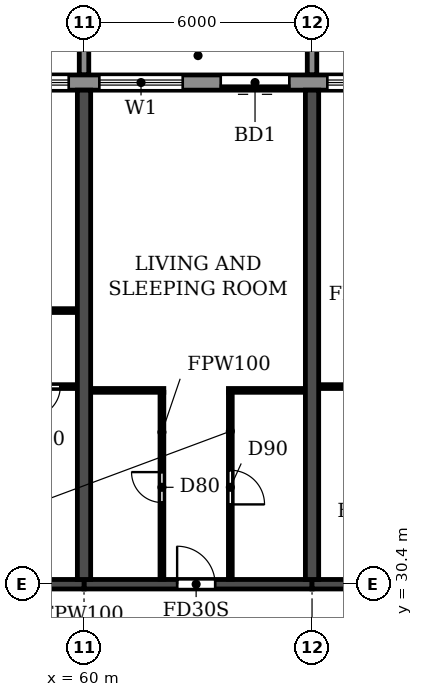
"""IFC4 building model, lengths in metres.
Left out: names, types, materials, properties, quantities, classifications, styles, units other than length and angle.
Written with IfcOpenShell. Run it as: python <this file> out.ifc"""

import sys

from ifc_helpers import new_model, si_unit, direction, frame, frame_2d, origin, place, context, subcontext, project, spatial, polyline, rectangle, outline, extrude, source, transform, mapped, element, fill, save


model = new_model("IFC4")
c1 = context("Model", 3, precision=1e-05, world=origin(), true_north=direction((0.0, 1.0)))
c2 = subcontext(c1, "Body", "Model", "MODEL_VIEW")
j1 = project(units=[si_unit("LENGTHUNIT", "METRE"), si_unit("PLANEANGLEUNIT", "RADIAN")], contexts=[c1])
p1 = place(None, origin())
s1 = spatial("IfcSite", under=j1, at=p1, CompositionType="ELEMENT")
p2 = place(p1, origin())
s2 = spatial("IfcBuilding", under=s1, at=p2, CompositionType="ELEMENT")
p3 = place(p2, frame((0.0, 0.0, 102.6)))
s3 = spatial("IfcBuildingStorey", under=s2, at=p3, CompositionType="ELEMENT", Elevation=102.6)
for number, where, z_axis, x_axis in (
    (1, (60.0, 30.525, 0.0), (0.0, 0.0, 1.0), (0.0, 1.0, 0.0)),
    (2, (66.0, 30.525, 0.0), (0.0, 0.0, 1.0), (0.0, 1.0, 0.0)),
):
    element("IfcWall", number, at=place(p3, frame(where, z_axis=z_axis, x_axis=x_axis)), inside=s3, PredefinedType="SHEAR", context=c2, shape_type="SweptSolid", body=[
        extrude(rectangle(XDim=12.875, YDim=0.35, at=frame_2d((6.438, 0.0))), origin(), (0.0, 0.0, 1.0), 3.0),
    ])
p4 = place(p3, frame((54.0, 30.4, 0.0), z_axis=(0.0, 0.0, 1.0), x_axis=(1.0, 0.0, 0.0)))
e3 = element("IfcWall", 3, at=p4, inside=s3, PredefinedType="SHEAR", context=c2, shape_type="SweptSolid", body=[
    extrude(rectangle(XDim=6.0, YDim=0.25, at=frame_2d((3.0, 0.0))), origin(), (0.0, 0.0, 1.0), 2.4),
])
p5 = place(p4, frame((2.55, 0.0, 0.0)))
e4 = element("IfcOpeningElement", 4, at=p5, cuts=e3, PredefinedType="OPENING", context=c2, shape_type="SweptSolid", body=[
    extrude(rectangle(XDim=1.0, YDim=2.1, at=frame_2d((0.5, 1.05))), frame((0.0, 0.135, 0.0), z_axis=(0.0, -1.0, 0.0), x_axis=(1.0, 0.0, 0.0)), (0.0, 0.0, 1.0), 0.27),
])
p6 = place(p3, frame((60.0, 30.4, 0.0), z_axis=(0.0, 0.0, 1.0), x_axis=(1.0, 0.0, 0.0)))
e5 = element("IfcWall", 5, at=p6, inside=s3, PredefinedType="SHEAR", context=c2, shape_type="SweptSolid", body=[
    extrude(rectangle(XDim=6.0, YDim=0.25, at=frame_2d((3.0, 0.0))), origin(), (0.0, 0.0, 1.0), 2.4),
])
p7 = place(p6, frame((2.45, 0.0, 0.0)))
e6 = element("IfcOpeningElement", 6, at=p7, cuts=e5, PredefinedType="OPENING", context=c2, shape_type="SweptSolid", body=[
    extrude(rectangle(XDim=1.0, YDim=2.1, at=frame_2d((0.5, 1.05))), frame((0.0, 0.135, 0.0), z_axis=(0.0, -1.0, 0.0), x_axis=(1.0, 0.0, 0.0)), (0.0, 0.0, 1.0), 0.27),
])
p8 = place(p3, frame((66.0, 30.4, 0.0), z_axis=(0.0, 0.0, 1.0), x_axis=(1.0, 0.0, 0.0)))
e7 = element("IfcWall", 7, at=p8, inside=s3, PredefinedType="SHEAR", context=c2, shape_type="SweptSolid", body=[
    extrude(rectangle(XDim=6.0, YDim=0.25, at=frame_2d((3.0, 0.0))), origin(), (0.0, 0.0, 1.0), 2.4),
])
p9 = place(p3, frame((91.317, 43.6, 0.0), z_axis=(0.0, 0.0, 1.0), x_axis=(-1.0, 0.0, 0.0)))
e8 = element("IfcWall", 8, at=p9, inside=s3, PredefinedType="STANDARD", context=c2, shape_type="SweptSolid", body=[
    extrude(rectangle(XDim=80.634, YDim=0.4, at=frame_2d((40.317, 0.0))), origin(), (0.0, 0.0, 1.0), 3.0),
])
p10 = place(p9, frame((76.717, 0.0, 0.9)))
e9 = element("IfcOpeningElement", 9, at=p10, cuts=e8, PredefinedType="OPENING", context=c2, shape_type="SweptSolid", body=[
    extrude(rectangle(XDim=2.2, YDim=1.5, at=frame_2d((1.1, 0.75))), frame((0.0, 0.21, 0.0), z_axis=(0.0, -1.0, 0.0), x_axis=(1.0, 0.0, 0.0)), (0.0, 0.0, 1.0), 0.42),
])
p11 = place(p9, frame((73.917, 0.0, 0.0)))
e10 = element("IfcOpeningElement", 10, at=p11, cuts=e8, PredefinedType="OPENING", context=c2, shape_type="SweptSolid", body=[
    extrude(rectangle(XDim=1.8, YDim=2.4, at=frame_2d((0.9, 1.2))), frame((0.0, 0.21, 0.0), z_axis=(0.0, -1.0, 0.0), x_axis=(1.0, 0.0, 0.0)), (0.0, 0.0, 1.0), 0.42),
])
p12 = place(p9, frame((70.717, 0.0, 0.9)))
e11 = element("IfcOpeningElement", 11, at=p12, cuts=e8, PredefinedType="OPENING", context=c2, shape_type="SweptSolid", body=[
    extrude(rectangle(XDim=2.2, YDim=1.5, at=frame_2d((1.1, 0.75))), frame((0.0, 0.21, 0.0), z_axis=(0.0, -1.0, 0.0), x_axis=(1.0, 0.0, 0.0)), (0.0, 0.0, 1.0), 0.42),
])
p13 = place(p9, frame((67.717, 0.0, 0.9)))
e12 = element("IfcOpeningElement", 12, at=p13, cuts=e8, PredefinedType="OPENING", context=c2, shape_type="SweptSolid", body=[
    extrude(rectangle(XDim=2.2, YDim=1.5, at=frame_2d((1.1, 0.75))), frame((0.0, 0.21, 0.0), z_axis=(0.0, -1.0, 0.0), x_axis=(1.0, 0.0, 0.0)), (0.0, 0.0, 1.0), 0.42),
])
p14 = place(p9, frame((64.917, 0.0, 0.0)))
e13 = element("IfcOpeningElement", 13, at=p14, cuts=e8, PredefinedType="OPENING", context=c2, shape_type="SweptSolid", body=[
    extrude(rectangle(XDim=1.8, YDim=2.4, at=frame_2d((0.9, 1.2))), frame((0.0, 0.21, 0.0), z_axis=(0.0, -1.0, 0.0), x_axis=(1.0, 0.0, 0.0)), (0.0, 0.0, 1.0), 0.42),
])
p15 = place(p9, frame((61.717, 0.0, 0.9)))
e14 = element("IfcOpeningElement", 14, at=p15, cuts=e8, PredefinedType="OPENING", context=c2, shape_type="SweptSolid", body=[
    extrude(rectangle(XDim=2.2, YDim=1.5, at=frame_2d((1.1, 0.75))), frame((0.0, 0.21, 0.0), z_axis=(0.0, -1.0, 0.0), x_axis=(1.0, 0.0, 0.0)), (0.0, 0.0, 1.0), 0.42),
])
p16 = place(p9, frame((58.717, 0.0, 0.9)))
e15 = element("IfcOpeningElement", 15, at=p16, cuts=e8, PredefinedType="OPENING", context=c2, shape_type="SweptSolid", body=[
    extrude(rectangle(XDim=2.2, YDim=1.5, at=frame_2d((1.1, 0.75))), frame((0.0, 0.21, 0.0), z_axis=(0.0, -1.0, 0.0), x_axis=(1.0, 0.0, 0.0)), (0.0, 0.0, 1.0), 0.42),
])
p17 = place(p9, frame((55.717, 0.0, 0.9)))
e16 = element("IfcOpeningElement", 16, at=p17, cuts=e8, PredefinedType="OPENING", context=c2, shape_type="SweptSolid", body=[
    extrude(rectangle(XDim=2.2, YDim=1.5, at=frame_2d((1.1, 0.75))), frame((0.0, 0.21, 0.0), z_axis=(0.0, -1.0, 0.0), x_axis=(1.0, 0.0, 0.0)), (0.0, 0.0, 1.0), 0.42),
])
p18 = place(p9, frame((52.717, 0.0, 0.9)))
e17 = element("IfcOpeningElement", 17, at=p18, cuts=e8, PredefinedType="OPENING", context=c2, shape_type="SweptSolid", body=[
    extrude(rectangle(XDim=2.2, YDim=1.5, at=frame_2d((1.1, 0.75))), frame((0.0, 0.21, 0.0), z_axis=(0.0, -1.0, 0.0), x_axis=(1.0, 0.0, 0.0)), (0.0, 0.0, 1.0), 0.42),
])
p19 = place(p9, frame((49.917, 0.0, 0.0)))
e18 = element("IfcOpeningElement", 18, at=p19, cuts=e8, PredefinedType="OPENING", context=c2, shape_type="SweptSolid", body=[
    extrude(rectangle(XDim=1.8, YDim=2.4, at=frame_2d((0.9, 1.2))), frame((0.0, 0.21, 0.0), z_axis=(0.0, -1.0, 0.0), x_axis=(1.0, 0.0, 0.0)), (0.0, 0.0, 1.0), 0.42),
])
p20 = place(p9, frame((46.717, 0.0, 0.9)))
e19 = element("IfcOpeningElement", 19, at=p20, cuts=e8, PredefinedType="OPENING", context=c2, shape_type="SweptSolid", body=[
    extrude(rectangle(XDim=2.2, YDim=1.5, at=frame_2d((1.1, 0.75))), frame((0.0, 0.21, 0.0), z_axis=(0.0, -1.0, 0.0), x_axis=(1.0, 0.0, 0.0)), (0.0, 0.0, 1.0), 0.42),
])
p21 = place(p9, frame((43.917, 0.0, 0.0)))
e20 = element("IfcOpeningElement", 20, at=p21, cuts=e8, PredefinedType="OPENING", context=c2, shape_type="SweptSolid", body=[
    extrude(rectangle(XDim=1.8, YDim=2.4, at=frame_2d((0.9, 1.2))), frame((0.0, 0.21, 0.0), z_axis=(0.0, -1.0, 0.0), x_axis=(1.0, 0.0, 0.0)), (0.0, 0.0, 1.0), 0.42),
])
p22 = place(p9, frame((40.717, 0.0, 0.9)))
e21 = element("IfcOpeningElement", 21, at=p22, cuts=e8, PredefinedType="OPENING", context=c2, shape_type="SweptSolid", body=[
    extrude(rectangle(XDim=2.2, YDim=1.5, at=frame_2d((1.1, 0.75))), frame((0.0, 0.21, 0.0), z_axis=(0.0, -1.0, 0.0), x_axis=(1.0, 0.0, 0.0)), (0.0, 0.0, 1.0), 0.42),
])
p23 = place(p9, frame((37.717, 0.0, 0.9)))
e22 = element("IfcOpeningElement", 22, at=p23, cuts=e8, PredefinedType="OPENING", context=c2, shape_type="SweptSolid", body=[
    extrude(rectangle(XDim=2.2, YDim=1.5, at=frame_2d((1.1, 0.75))), frame((0.0, 0.21, 0.0), z_axis=(0.0, -1.0, 0.0), x_axis=(1.0, 0.0, 0.0)), (0.0, 0.0, 1.0), 0.42),
])
p24 = place(p9, frame((34.917, 0.0, 0.0)))
e23 = element("IfcOpeningElement", 23, at=p24, cuts=e8, PredefinedType="OPENING", context=c2, shape_type="SweptSolid", body=[
    extrude(rectangle(XDim=1.8, YDim=2.4, at=frame_2d((0.9, 1.2))), frame((0.0, 0.21, 0.0), z_axis=(0.0, -1.0, 0.0), x_axis=(1.0, 0.0, 0.0)), (0.0, 0.0, 1.0), 0.42),
])
p25 = place(p9, frame((31.717, 0.0, 0.9)))
e24 = element("IfcOpeningElement", 24, at=p25, cuts=e8, PredefinedType="OPENING", context=c2, shape_type="SweptSolid", body=[
    extrude(rectangle(XDim=2.2, YDim=1.5, at=frame_2d((1.1, 0.75))), frame((0.0, 0.21, 0.0), z_axis=(0.0, -1.0, 0.0), x_axis=(1.0, 0.0, 0.0)), (0.0, 0.0, 1.0), 0.42),
])
p26 = place(p9, frame((28.717, 0.0, 0.9)))
e25 = element("IfcOpeningElement", 25, at=p26, cuts=e8, PredefinedType="OPENING", context=c2, shape_type="SweptSolid", body=[
    extrude(rectangle(XDim=2.2, YDim=1.5, at=frame_2d((1.1, 0.75))), frame((0.0, 0.21, 0.0), z_axis=(0.0, -1.0, 0.0), x_axis=(1.0, 0.0, 0.0)), (0.0, 0.0, 1.0), 0.42),
])
p27 = place(p9, frame((25.917, 0.0, 0.0)))
e26 = element("IfcOpeningElement", 26, at=p27, cuts=e8, PredefinedType="OPENING", context=c2, shape_type="SweptSolid", body=[
    extrude(rectangle(XDim=1.8, YDim=2.4, at=frame_2d((0.9, 1.2))), frame((0.0, 0.21, 0.0), z_axis=(0.0, -1.0, 0.0), x_axis=(1.0, 0.0, 0.0)), (0.0, 0.0, 1.0), 0.42),
])
p28 = place(p9, frame((22.717, 0.0, 0.9)))
e27 = element("IfcOpeningElement", 27, at=p28, cuts=e8, PredefinedType="OPENING", context=c2, shape_type="SweptSolid", body=[
    extrude(rectangle(XDim=2.2, YDim=1.5, at=frame_2d((1.1, 0.75))), frame((0.0, 0.21, 0.0), z_axis=(0.0, -1.0, 0.0), x_axis=(1.0, 0.0, 0.0)), (0.0, 0.0, 1.0), 0.42),
])
p29 = place(p9, frame((19.717, 0.0, 0.9)))
e28 = element("IfcOpeningElement", 28, at=p29, cuts=e8, PredefinedType="OPENING", context=c2, shape_type="SweptSolid", body=[
    extrude(rectangle(XDim=2.2, YDim=1.5, at=frame_2d((1.1, 0.75))), frame((0.0, 0.21, 0.0), z_axis=(0.0, -1.0, 0.0), x_axis=(1.0, 0.0, 0.0)), (0.0, 0.0, 1.0), 0.42),
])
p30 = place(p9, frame((16.917, 0.0, 0.0)))
e29 = element("IfcOpeningElement", 29, at=p30, cuts=e8, PredefinedType="OPENING", context=c2, shape_type="SweptSolid", body=[
    extrude(rectangle(XDim=1.8, YDim=2.4, at=frame_2d((0.9, 1.2))), frame((0.0, 0.21, 0.0), z_axis=(0.0, -1.0, 0.0), x_axis=(1.0, 0.0, 0.0)), (0.0, 0.0, 1.0), 0.42),
])
p31 = place(p9, frame((13.717, 0.0, 0.9)))
e30 = element("IfcOpeningElement", 30, at=p31, cuts=e8, PredefinedType="OPENING", context=c2, shape_type="SweptSolid", body=[
    extrude(rectangle(XDim=2.2, YDim=1.5, at=frame_2d((1.1, 0.75))), frame((0.0, 0.21, 0.0), z_axis=(0.0, -1.0, 0.0), x_axis=(1.0, 0.0, 0.0)), (0.0, 0.0, 1.0), 0.42),
])
p32 = place(p9, frame((10.917, 0.0, 0.0)))
e31 = element("IfcOpeningElement", 31, at=p32, cuts=e8, PredefinedType="OPENING", context=c2, shape_type="SweptSolid", body=[
    extrude(rectangle(XDim=1.8, YDim=2.4, at=frame_2d((0.9, 1.2))), frame((0.0, 0.21, 0.0), z_axis=(0.0, -1.0, 0.0), x_axis=(1.0, 0.0, 0.0)), (0.0, 0.0, 1.0), 0.42),
])
p33 = place(p9, frame((7.717, 0.0, 0.9)))
e32 = element("IfcOpeningElement", 32, at=p33, cuts=e8, PredefinedType="OPENING", context=c2, shape_type="SweptSolid", body=[
    extrude(rectangle(XDim=2.2, YDim=1.5, at=frame_2d((1.1, 0.75))), frame((0.0, 0.21, 0.0), z_axis=(0.0, -1.0, 0.0), x_axis=(1.0, 0.0, 0.0)), (0.0, 0.0, 1.0), 0.42),
])
p34 = place(p9, frame((4.717, 0.0, 0.9)))
e33 = element("IfcOpeningElement", 33, at=p34, cuts=e8, PredefinedType="OPENING", context=c2, shape_type="SweptSolid", body=[
    extrude(rectangle(XDim=2.2, YDim=1.5, at=frame_2d((1.1, 0.75))), frame((0.0, 0.21, 0.0), z_axis=(0.0, -1.0, 0.0), x_axis=(1.0, 0.0, 0.0)), (0.0, 0.0, 1.0), 0.42),
])
p35 = place(p9, frame((1.917, 0.0, 0.0)))
e34 = element("IfcOpeningElement", 34, at=p35, cuts=e8, PredefinedType="OPENING", context=c2, shape_type="SweptSolid", body=[
    extrude(rectangle(XDim=1.8, YDim=2.4, at=frame_2d((0.9, 1.2))), frame((0.0, 0.21, 0.0), z_axis=(0.0, -1.0, 0.0), x_axis=(1.0, 0.0, 0.0)), (0.0, 0.0, 1.0), 0.42),
])
m1 = source(origin(), c2, "Body", "SweptSolid", [
    extrude(outline(polyline([(0.0, 0.0), (0.25, 0.0), (0.25, 3.1), (0.0, 3.1), (0.0, 0.0)])), origin(), (0.0, 0.0, 1.0), 3.1),
])
for number, where in (
    (35, (59.875, 43.8, 0.0)),
    (36, (65.875, 43.8, 0.0)),
):
    element("IfcWall", number, at=place(p3, frame(where)), inside=s3, PredefinedType="STANDARD", context=c2, shape_type="MappedRepresentation", body=[
        mapped(m1, transform((0.0, 0.0, 0.0))),
    ])
p36 = place(p3, frame((60.185, 35.5, 0.0), z_axis=(0.0, 0.0, 1.0), x_axis=(1.0, 0.0, 0.0)))
e37 = element("IfcWall", 37, at=p36, inside=s3, PredefinedType="PARTITIONING", context=c2, shape_type="SweptSolid", body=[
    extrude(rectangle(XDim=1.915, YDim=0.1, at=frame_2d((0.958, 0.0))), origin(), (0.0, 0.0, 1.0), 3.0),
])
p37 = place(p3, frame((63.8, 35.5, 0.0), z_axis=(0.0, 0.0, 1.0), x_axis=(1.0, 0.0, 0.0)))
e38 = element("IfcWall", 38, at=p37, inside=s3, PredefinedType="PARTITIONING", context=c2, shape_type="SweptSolid", body=[
    extrude(rectangle(XDim=2.015, YDim=0.1, at=frame_2d((1.007, 0.0))), origin(), (0.0, 0.0, 1.0), 3.0),
])
p38 = place(p3, frame((57.9, 35.6, 0.0), z_axis=(0.0, 0.0, 1.0), x_axis=(1.0, 0.0, 0.0)))
e39 = element("IfcWall", 39, at=p38, inside=s3, PredefinedType="PARTITIONING", context=c2, shape_type="SweptSolid", body=[
    extrude(rectangle(XDim=1.915, YDim=0.1, at=frame_2d((0.958, 0.0))), origin(), (0.0, 0.0, 1.0), 3.0),
])
p39 = place(p38, frame((0.675, 0.0, 0.0)))
e40 = element("IfcOpeningElement", 40, at=p39, cuts=e39, PredefinedType="OPENING", context=c2, shape_type="SweptSolid", body=[
    extrude(rectangle(XDim=0.8, YDim=2.1, at=frame_2d((0.4, 1.05))), frame((0.0, 0.06, 0.0), z_axis=(0.0, -1.0, 0.0), x_axis=(1.0, 0.0, 0.0)), (0.0, 0.0, 1.0), 0.12),
])
p40 = place(p3, frame((66.185, 35.6, 0.0), z_axis=(0.0, 0.0, 1.0), x_axis=(1.0, 0.0, 0.0)))
e41 = element("IfcWall", 41, at=p40, inside=s3, PredefinedType="PARTITIONING", context=c2, shape_type="SweptSolid", body=[
    extrude(rectangle(XDim=5.63, YDim=0.1, at=frame_2d((2.815, 0.0))), origin(), (0.0, 0.0, 1.0), 3.0),
])
p41 = place(p40, frame((1.415, 0.0, 0.0)))
e42 = element("IfcOpeningElement", 42, at=p41, cuts=e41, PredefinedType="OPENING", context=c2, shape_type="SweptSolid", body=[
    extrude(rectangle(XDim=0.9, YDim=2.1, at=frame_2d((0.45, 1.05))), frame((0.0, 0.06, 0.0), z_axis=(0.0, -1.0, 0.0), x_axis=(1.0, 0.0, 0.0)), (0.0, 0.0, 1.0), 0.12),
])
p42 = place(p40, frame((3.315, 0.0, 0.0)))
e43 = element("IfcOpeningElement", 43, at=p42, cuts=e41, PredefinedType="OPENING", context=c2, shape_type="SweptSolid", body=[
    extrude(rectangle(XDim=0.9, YDim=2.1, at=frame_2d((0.45, 1.05))), frame((0.0, 0.06, 0.0), z_axis=(0.0, -1.0, 0.0), x_axis=(1.0, 0.0, 0.0)), (0.0, 0.0, 1.0), 0.12),
])
p43 = place(p3, frame((56.95, 37.6, 0.0), z_axis=(0.0, 0.0, 1.0), x_axis=(1.0, 0.0, 0.0)))
e44 = element("IfcWall", 44, at=p43, inside=s3, PredefinedType="PARTITIONING", context=c2, shape_type="SweptSolid", body=[
    extrude(rectangle(XDim=2.865, YDim=0.1, at=frame_2d((1.433, 0.0))), origin(), (0.0, 0.0, 1.0), 3.0),
])
p44 = place(p43, frame((0.55, 0.0, 0.0)))
e45 = element("IfcOpeningElement", 45, at=p44, cuts=e44, PredefinedType="OPENING", context=c2, shape_type="SweptSolid", body=[
    extrude(rectangle(XDim=0.9, YDim=2.1, at=frame_2d((0.45, 1.05))), frame((0.0, 0.06, 0.0), z_axis=(0.0, -1.0, 0.0), x_axis=(1.0, 0.0, 0.0)), (0.0, 0.0, 1.0), 0.12),
])
p45 = place(p3, frame((62.05, 30.535, 0.0), z_axis=(0.0, 0.0, 1.0), x_axis=(0.0, 1.0, 0.0)))
e46 = element("IfcWall", 46, at=p45, inside=s3, PredefinedType="PARTITIONING", context=c2, shape_type="SweptSolid", body=[
    extrude(rectangle(XDim=4.915, YDim=0.1, at=frame_2d((2.458, 0.0))), origin(), (0.0, 0.0, 1.0), 3.0),
])
p46 = place(p45, frame((2.015, 0.0, 0.0)))
e47 = element("IfcOpeningElement", 47, at=p46, cuts=e46, PredefinedType="OPENING", context=c2, shape_type="SweptSolid", body=[
    extrude(rectangle(XDim=0.8, YDim=2.1, at=frame_2d((0.4, 1.05))), frame((0.0, 0.06, 0.0), z_axis=(0.0, -1.0, 0.0), x_axis=(1.0, 0.0, 0.0)), (0.0, 0.0, 1.0), 0.12),
])
p47 = place(p3, frame((63.85, 30.535, 0.0), z_axis=(0.0, 0.0, 1.0), x_axis=(0.0, 1.0, 0.0)))
e48 = element("IfcWall", 48, at=p47, inside=s3, PredefinedType="PARTITIONING", context=c2, shape_type="SweptSolid", body=[
    extrude(rectangle(XDim=4.915, YDim=0.1, at=frame_2d((2.458, 0.0))), origin(), (0.0, 0.0, 1.0), 3.0),
])
p48 = place(p47, frame((1.965, 0.0, 0.0)))
e49 = element("IfcOpeningElement", 49, at=p48, cuts=e48, PredefinedType="OPENING", context=c2, shape_type="SweptSolid", body=[
    extrude(rectangle(XDim=0.9, YDim=2.1, at=frame_2d((0.45, 1.05))), frame((0.0, 0.06, 0.0), z_axis=(0.0, -1.0, 0.0), x_axis=(1.0, 0.0, 0.0)), (0.0, 0.0, 1.0), 0.12),
])
p49 = place(p25, origin())
e50 = element("IfcWindow", 50, at=p49, inside=s3, PartitioningType="DOUBLE_PANEL_HORIZONTAL", PredefinedType="WINDOW", context=c2, shape_type="SweptSolid", body=[
    extrude(rectangle(XDim=2.2, YDim=1.5, at=frame_2d((1.1, 0.75))), frame((0.0, 0.03, 0.0), z_axis=(0.0, -1.0, 0.0), x_axis=(1.0, 0.0, 0.0)), (0.0, 0.0, 1.0), 0.06),
])
fill(e24, e50)
p50 = place(p26, origin())
e51 = element("IfcWindow", 51, at=p50, inside=s3, PartitioningType="DOUBLE_PANEL_HORIZONTAL", PredefinedType="WINDOW", context=c2, shape_type="SweptSolid", body=[
    extrude(rectangle(XDim=2.2, YDim=1.5, at=frame_2d((1.1, 0.75))), frame((0.0, 0.03, 0.0), z_axis=(0.0, -1.0, 0.0), x_axis=(1.0, 0.0, 0.0)), (0.0, 0.0, 1.0), 0.06),
])
fill(e25, e51)
p51 = place(p27, origin())
e52 = element("IfcDoor", 52, at=p51, inside=s3, OperationType="DOUBLE_DOOR_SLIDING", PredefinedType="DOOR", context=c2, shape_type="SweptSolid", body=[
    extrude(rectangle(XDim=1.8, YDim=2.4, at=frame_2d((0.9, 1.2))), frame((0.0, 0.025, 0.0), z_axis=(0.0, -1.0, 0.0), x_axis=(1.0, 0.0, 0.0)), (0.0, 0.0, 1.0), 0.05),
])
fill(e26, e52)
p52 = place(p28, origin())
e53 = element("IfcWindow", 53, at=p52, inside=s3, PartitioningType="DOUBLE_PANEL_HORIZONTAL", PredefinedType="WINDOW", context=c2, shape_type="SweptSolid", body=[
    extrude(rectangle(XDim=2.2, YDim=1.5, at=frame_2d((1.1, 0.75))), frame((0.0, 0.03, 0.0), z_axis=(0.0, -1.0, 0.0), x_axis=(1.0, 0.0, 0.0)), (0.0, 0.0, 1.0), 0.06),
])
fill(e27, e53)
p53 = place(p39, frame((0.8, 0.0, 0.0), z_axis=(0.0, 0.0, 1.0), x_axis=(-1.0, 0.0, 0.0)))
e54 = element("IfcDoor", 54, at=p53, inside=s3, OperationType="SINGLE_SWING_RIGHT", PredefinedType="DOOR", context=c2, shape_type="SweptSolid", body=[
    extrude(rectangle(XDim=0.8, YDim=2.1, at=frame_2d((0.4, 1.05))), frame((0.0, 0.025, 0.0), z_axis=(0.0, -1.0, 0.0), x_axis=(1.0, 0.0, 0.0)), (0.0, 0.0, 1.0), 0.05),
])
fill(e40, e54)
p54 = place(p46, origin())
e55 = element("IfcDoor", 55, at=p54, inside=s3, OperationType="SINGLE_SWING_RIGHT", PredefinedType="DOOR", context=c2, shape_type="SweptSolid", body=[
    extrude(rectangle(XDim=0.8, YDim=2.1, at=frame_2d((0.4, 1.05))), frame((0.0, 0.025, 0.0), z_axis=(0.0, -1.0, 0.0), x_axis=(1.0, 0.0, 0.0)), (0.0, 0.0, 1.0), 0.05),
])
fill(e47, e55)
p55 = place(p7, origin())
e56 = element("IfcDoor", 56, at=p55, inside=s3, OperationType="SINGLE_SWING_LEFT", PredefinedType="DOOR", context=c2, shape_type="SweptSolid", body=[
    extrude(rectangle(XDim=1.0, YDim=2.1, at=frame_2d((0.5, 1.05))), frame((0.0, 0.025, 0.0), z_axis=(0.0, -1.0, 0.0), x_axis=(1.0, 0.0, 0.0)), (0.0, 0.0, 1.0), 0.05),
])
fill(e6, e56)
p56 = place(p48, frame((0.9, 0.0, 0.0), z_axis=(0.0, 0.0, 1.0), x_axis=(-1.0, 0.0, 0.0)))
e57 = element("IfcDoor", 57, at=p56, inside=s3, OperationType="SINGLE_SWING_RIGHT", PredefinedType="DOOR", context=c2, shape_type="SweptSolid", body=[
    extrude(rectangle(XDim=0.9, YDim=2.1, at=frame_2d((0.45, 1.05))), frame((0.0, 0.025, 0.0), z_axis=(0.0, -1.0, 0.0), x_axis=(1.0, 0.0, 0.0)), (0.0, 0.0, 1.0), 0.05),
])
fill(e49, e57)
save(model, sys.argv[1])
